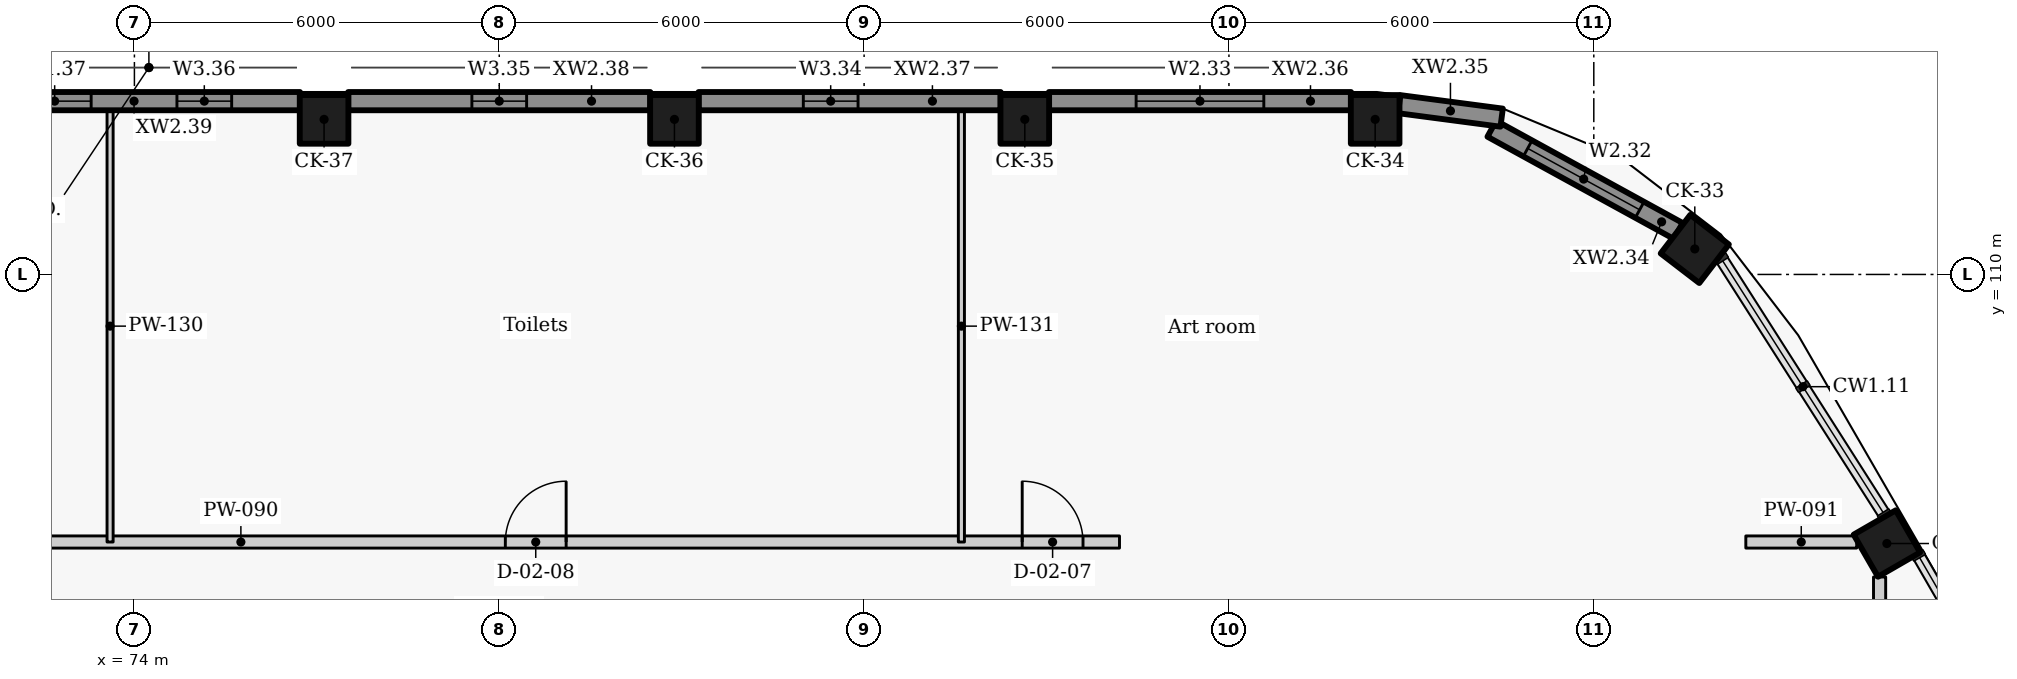
"""IFC4 building model, lengths in metres.
Left out: names, types, materials, properties, quantities, classifications, styles, units other than length and angle.
Written with IfcOpenShell. Run it as: python <this file> out.ifc"""

import sys

from ifc_helpers import new_model, si_unit, direction, frame, frame_2d, origin, origin_2d, place, context, subcontext, project, spatial, rectangle, extrude, element, fill, save


model = new_model("IFC4")
c1 = context("Model", 3, precision=1e-05, world=origin(), true_north=direction((0.0, 1.0)))
c2 = subcontext(c1, "Body", "Model", "MODEL_VIEW")
j1 = project(units=[si_unit("LENGTHUNIT", "METRE"), si_unit("PLANEANGLEUNIT", "RADIAN")], contexts=[c1])
p1 = place(None, origin())
s1 = spatial("IfcSite", under=j1, at=p1, CompositionType="ELEMENT")
p2 = place(p1, origin())
s2 = spatial("IfcBuilding", under=s1, at=p2, CompositionType="ELEMENT")
p3 = place(p2, frame((0.0, 0.0, 11.4)))
s3 = spatial("IfcBuildingStorey", under=s2, at=p3, CompositionType="ELEMENT", Elevation=11.4)
for number, where, z_axis, x_axis in (
    (1, (102.82, 105.575, 0.0), (0.0, 0.0, 1.0), (-0.5, 0.866, 0.0)),
    (2, (99.661, 110.419, 0.0), (0.0, 0.0, 1.0), (-0.793, 0.609, 0.0)),
    (3, (94.404, 112.55, 0.0), (0.0, 0.0, 1.0), (-1.0, 0.0, 0.0)),
    (4, (88.643, 112.55, 0.0), (0.0, 0.0, 1.0), (-1.0, 0.0, 0.0)),
    (5, (82.881, 112.55, 0.0), (0.0, 0.0, 1.0), (-1.0, 0.0, 0.0)),
    (6, (77.119, 112.55, 0.0), (0.0, 0.0, 1.0), (-1.0, 0.0, 0.0)),
):
    element("IfcColumn", number, at=place(p3, frame(where, z_axis=z_axis, x_axis=x_axis)), inside=s3, PredefinedType="COLUMN", context=c2, shape_type="SweptSolid", body=[
        extrude(rectangle(XDim=0.8, YDim=0.8, at=origin_2d()), origin(), (0.0, 0.0, 1.0), 4.2),
    ])
p4 = place(p3, frame((99.389, 110.715, 0.0), z_axis=(0.0, 0.0, 1.0), x_axis=(-0.876785818174, 0.480881096581, 0.0)))
e7 = element("IfcWall", 7, at=p4, inside=s3, PredefinedType="SOLIDWALL", context=c2, shape_type="SweptSolid", body=[
    extrude(rectangle(XDim=3.497, YDim=0.3, at=frame_2d((1.748, 0.0))), origin(), (0.0, 0.0, 1.0), 3.0),
])
p5 = place(p4, frame((0.723, 0.0, 0.9)))
e8 = element("IfcOpeningElement", 8, at=p5, cuts=e7, PredefinedType="OPENING", context=c2, shape_type="SweptSolid", body=[
    extrude(rectangle(XDim=2.1, YDim=2.05, at=frame_2d((1.05, 1.025))), frame((0.0, 0.16, 0.0), z_axis=(0.0, -1.0, 0.0), x_axis=(1.0, 0.0, 0.0)), (0.0, 0.0, 1.0), 0.32),
])
p6 = place(p3, frame((96.485, 112.579, 0.0), z_axis=(0.0, 0.0, 1.0), x_axis=(-0.991431291018, 0.130629227937, 0.0)))
e9 = element("IfcWall", 9, at=p6, inside=s3, PredefinedType="SOLIDWALL", context=c2, shape_type="SweptSolid", body=[
    extrude(rectangle(XDim=1.699, YDim=0.3, at=frame_2d((0.85, 0.0))), origin(), (0.0, 0.0, 1.0), 3.0),
])
p7 = place(p3, frame((94.008, 112.85, 0.0), z_axis=(0.0, 0.0, 1.0), x_axis=(-1.0, 0.0, 0.0)))
e10 = element("IfcWall", 10, at=p7, inside=s3, PredefinedType="SOLIDWALL", context=c2, shape_type="SweptSolid", body=[
    extrude(rectangle(XDim=4.97, YDim=0.3, at=frame_2d((2.485, 0.0))), origin(), (0.0, 0.0, 1.0), 3.0),
])
p8 = place(p7, frame((1.435, 0.0, 0.9)))
e11 = element("IfcOpeningElement", 11, at=p8, cuts=e10, PredefinedType="OPENING", context=c2, shape_type="SweptSolid", body=[
    extrude(rectangle(XDim=2.1, YDim=2.05, at=frame_2d((1.05, 1.025))), frame((0.0, 0.16, 0.0), z_axis=(0.0, -1.0, 0.0), x_axis=(1.0, 0.0, 0.0)), (0.0, 0.0, 1.0), 0.32),
])
p9 = place(p3, frame((88.247, 112.85, 0.0), z_axis=(0.0, 0.0, 1.0), x_axis=(-1.0, 0.0, 0.0)))
e12 = element("IfcWall", 12, at=p9, inside=s3, PredefinedType="SOLIDWALL", context=c2, shape_type="SweptSolid", body=[
    extrude(rectangle(XDim=4.97, YDim=0.3, at=frame_2d((2.485, 0.0))), origin(), (0.0, 0.0, 1.0), 3.0),
])
p10 = place(p9, frame((2.346, 0.0, 1.5)))
e13 = element("IfcOpeningElement", 13, at=p10, cuts=e12, PredefinedType="OPENING", context=c2, shape_type="SweptSolid", body=[
    extrude(rectangle(XDim=0.9, YDim=1.45, at=frame_2d((0.45, 0.725))), frame((0.0, 0.16, 0.0), z_axis=(0.0, -1.0, 0.0), x_axis=(1.0, 0.0, 0.0)), (0.0, 0.0, 1.0), 0.32),
])
p11 = place(p3, frame((82.485, 112.85, 0.0), z_axis=(0.0, 0.0, 1.0), x_axis=(-1.0, 0.0, 0.0)))
e14 = element("IfcWall", 14, at=p11, inside=s3, PredefinedType="SOLIDWALL", context=c2, shape_type="SweptSolid", body=[
    extrude(rectangle(XDim=4.97, YDim=0.3, at=frame_2d((2.485, 0.0))), origin(), (0.0, 0.0, 1.0), 3.0),
])
p12 = place(p11, frame((2.035, 0.0, 1.5)))
e15 = element("IfcOpeningElement", 15, at=p12, cuts=e14, PredefinedType="OPENING", context=c2, shape_type="SweptSolid", body=[
    extrude(rectangle(XDim=0.9, YDim=1.45, at=frame_2d((0.45, 0.725))), frame((0.0, 0.16, 0.0), z_axis=(0.0, -1.0, 0.0), x_axis=(1.0, 0.0, 0.0)), (0.0, 0.0, 1.0), 0.32),
])
p13 = place(p3, frame((76.723, 112.85, 0.0), z_axis=(0.0, 0.0, 1.0), x_axis=(-1.0, 0.0, 0.0)))
e16 = element("IfcWall", 16, at=p13, inside=s3, PredefinedType="SOLIDWALL", context=c2, shape_type="SweptSolid", body=[
    extrude(rectangle(XDim=4.97, YDim=0.3, at=frame_2d((2.485, 0.0))), origin(), (0.0, 0.0, 1.0), 3.0),
])
p14 = place(p13, frame((1.124, 0.0, 1.5)))
e17 = element("IfcOpeningElement", 17, at=p14, cuts=e16, PredefinedType="OPENING", context=c2, shape_type="SweptSolid", body=[
    extrude(rectangle(XDim=0.9, YDim=1.45, at=frame_2d((0.45, 0.725))), frame((0.0, 0.16, 0.0), z_axis=(0.0, -1.0, 0.0), x_axis=(1.0, 0.0, 0.0)), (0.0, 0.0, 1.0), 0.32),
])
p15 = place(p13, frame((3.434, 0.0, 0.9)))
e18 = element("IfcOpeningElement", 18, at=p15, cuts=e16, PredefinedType="OPENING", context=c2, shape_type="SweptSolid", body=[
    extrude(rectangle(XDim=1.2, YDim=2.05, at=frame_2d((0.6, 1.025))), frame((0.0, 0.16, 0.0), z_axis=(0.0, -1.0, 0.0), x_axis=(1.0, 0.0, 0.0)), (0.0, 0.0, 1.0), 0.32),
])
p16 = place(p3, frame((102.7, 105.025, 0.0), z_axis=(0.0, 0.0, 1.0), x_axis=(0.0, -1.0, 0.0)))
e19 = element("IfcWall", 19, at=p16, inside=s3, PredefinedType="PARTITIONING", context=c2, shape_type="SweptSolid", body=[
    extrude(rectangle(XDim=6.578, YDim=0.2, at=frame_2d((3.289, 0.0))), origin(), (0.0, 0.0, 1.0), 3.9),
])
p17 = place(p16, frame((2.539, 0.0, 0.0)))
e20 = element("IfcOpeningElement", 20, at=p17, cuts=e19, PredefinedType="OPENING", context=c2, shape_type="SweptSolid", body=[
    extrude(rectangle(XDim=1.5, YDim=2.1, at=frame_2d((0.75, 1.05))), frame((0.0, 0.11, 0.0), z_axis=(0.0, -1.0, 0.0), x_axis=(1.0, 0.0, 0.0)), (0.0, 0.0, 1.0), 0.22),
])
p18 = place(p3, frame((69.8, 105.6, 0.0), z_axis=(0.0, 0.0, 1.0), x_axis=(1.0, 0.0, 0.0)))
e21 = element("IfcWall", 21, at=p18, inside=s3, PredefinedType="PARTITIONING", context=c2, shape_type="SweptSolid", body=[
    extrude(rectangle(XDim=20.4, YDim=0.2, at=frame_2d((10.2, 0.0))), origin(), (0.0, 0.0, 1.0), 3.9),
])
p19 = place(p18, frame((0.602, 0.0, 0.0)))
e22 = element("IfcOpeningElement", 22, at=p19, cuts=e21, PredefinedType="OPENING", context=c2, shape_type="SweptSolid", body=[
    extrude(rectangle(XDim=1.0, YDim=2.1, at=frame_2d((0.5, 1.05))), frame((0.0, 0.11, 0.0), z_axis=(0.0, -1.0, 0.0), x_axis=(1.0, 0.0, 0.0)), (0.0, 0.0, 1.0), 0.22),
])
p20 = place(p18, frame((18.8, 0.0, 0.0)))
e23 = element("IfcOpeningElement", 23, at=p20, cuts=e21, PredefinedType="OPENING", context=c2, shape_type="SweptSolid", body=[
    extrude(rectangle(XDim=1.0, YDim=2.1, at=frame_2d((0.5, 1.05))), frame((0.0, 0.11, 0.0), z_axis=(0.0, -1.0, 0.0), x_axis=(1.0, 0.0, 0.0)), (0.0, 0.0, 1.0), 0.22),
])
p21 = place(p18, frame((10.3, 0.0, 0.0)))
e24 = element("IfcOpeningElement", 24, at=p21, cuts=e21, PredefinedType="OPENING", context=c2, shape_type="SweptSolid", body=[
    extrude(rectangle(XDim=1.0, YDim=2.1, at=frame_2d((0.5, 1.05))), frame((0.0, 0.11, 0.0), z_axis=(0.0, -1.0, 0.0), x_axis=(1.0, 0.0, 0.0)), (0.0, 0.0, 1.0), 0.22),
])
p22 = place(p3, frame((100.5, 105.6, 0.0), z_axis=(0.0, 0.0, 1.0), x_axis=(1.0, 0.0, 0.0)))
e25 = element("IfcWall", 25, at=p22, inside=s3, PredefinedType="PARTITIONING", context=c2, shape_type="SweptSolid", body=[
    extrude(rectangle(XDim=1.823, YDim=0.2, at=frame_2d((0.912, 0.0))), origin(), (0.0, 0.0, 1.0), 3.9),
])
for number, where, z_axis, x_axis in (
    (26, (73.6, 105.6, 0.0), (0.0, 0.0, 1.0), (0.0, 1.0, 0.0)),
    (27, (87.6, 105.6, 0.0), (0.0, 0.0, 1.0), (0.0, 1.0, 0.0)),
):
    element("IfcWall", number, at=place(p3, frame(where, z_axis=z_axis, x_axis=x_axis)), inside=s3, PredefinedType="PARTITIONING", context=c2, shape_type="SweptSolid", body=[
        extrude(rectangle(XDim=7.1, YDim=0.1, at=frame_2d((3.55, 0.0))), origin(), (0.0, 0.0, 1.0), 3.13),
    ])
p23 = place(p5, origin())
e28 = element("IfcWindow", 28, at=p23, inside=s3, PartitioningType="SINGLE_PANEL", PredefinedType="WINDOW", context=c2, shape_type="SweptSolid", body=[
    extrude(rectangle(XDim=2.1, YDim=2.05, at=frame_2d((1.05, 1.025))), frame((0.0, 0.03, 0.0), z_axis=(0.0, -1.0, 0.0), x_axis=(1.0, 0.0, 0.0)), (0.0, 0.0, 1.0), 0.06),
])
fill(e8, e28)
p24 = place(p8, origin())
e29 = element("IfcWindow", 29, at=p24, inside=s3, PartitioningType="SINGLE_PANEL", PredefinedType="WINDOW", context=c2, shape_type="SweptSolid", body=[
    extrude(rectangle(XDim=2.1, YDim=2.05, at=frame_2d((1.05, 1.025))), frame((0.0, 0.03, 0.0), z_axis=(0.0, -1.0, 0.0), x_axis=(1.0, 0.0, 0.0)), (0.0, 0.0, 1.0), 0.06),
])
fill(e11, e29)
p25 = place(p10, origin())
e30 = element("IfcWindow", 30, at=p25, inside=s3, PartitioningType="SINGLE_PANEL", PredefinedType="WINDOW", context=c2, shape_type="SweptSolid", body=[
    extrude(rectangle(XDim=0.9, YDim=1.45, at=frame_2d((0.45, 0.725))), frame((0.0, 0.03, 0.0), z_axis=(0.0, -1.0, 0.0), x_axis=(1.0, 0.0, 0.0)), (0.0, 0.0, 1.0), 0.06),
])
fill(e13, e30)
p26 = place(p12, origin())
e31 = element("IfcWindow", 31, at=p26, inside=s3, PartitioningType="SINGLE_PANEL", PredefinedType="WINDOW", context=c2, shape_type="SweptSolid", body=[
    extrude(rectangle(XDim=0.9, YDim=1.45, at=frame_2d((0.45, 0.725))), frame((0.0, 0.03, 0.0), z_axis=(0.0, -1.0, 0.0), x_axis=(1.0, 0.0, 0.0)), (0.0, 0.0, 1.0), 0.06),
])
fill(e15, e31)
p27 = place(p14, origin())
e32 = element("IfcWindow", 32, at=p27, inside=s3, PartitioningType="SINGLE_PANEL", PredefinedType="WINDOW", context=c2, shape_type="SweptSolid", body=[
    extrude(rectangle(XDim=0.9, YDim=1.45, at=frame_2d((0.45, 0.725))), frame((0.0, 0.03, 0.0), z_axis=(0.0, -1.0, 0.0), x_axis=(1.0, 0.0, 0.0)), (0.0, 0.0, 1.0), 0.06),
])
fill(e17, e32)
p28 = place(p15, origin())
e33 = element("IfcWindow", 33, at=p28, inside=s3, PartitioningType="SINGLE_PANEL", PredefinedType="WINDOW", context=c2, shape_type="SweptSolid", body=[
    extrude(rectangle(XDim=1.2, YDim=2.05, at=frame_2d((0.6, 1.025))), frame((0.0, 0.03, 0.0), z_axis=(0.0, -1.0, 0.0), x_axis=(1.0, 0.0, 0.0)), (0.0, 0.0, 1.0), 0.06),
])
fill(e18, e33)
p29 = place(p20, origin())
e34 = element("IfcDoor", 34, at=p29, inside=s3, OperationType="SINGLE_SWING_LEFT", PredefinedType="DOOR", context=c2, shape_type="SweptSolid", body=[
    extrude(rectangle(XDim=1.0, YDim=2.1, at=frame_2d((0.5, 1.05))), frame((0.0, 0.025, 0.0), z_axis=(0.0, -1.0, 0.0), x_axis=(1.0, 0.0, 0.0)), (0.0, 0.0, 1.0), 0.05),
])
fill(e23, e34)
p30 = place(p21, origin())
e35 = element("IfcDoor", 35, at=p30, inside=s3, OperationType="SINGLE_SWING_RIGHT", PredefinedType="DOOR", context=c2, shape_type="SweptSolid", body=[
    extrude(rectangle(XDim=1.0, YDim=2.1, at=frame_2d((0.5, 1.05))), frame((0.0, 0.025, 0.0), z_axis=(0.0, -1.0, 0.0), x_axis=(1.0, 0.0, 0.0)), (0.0, 0.0, 1.0), 0.05),
])
fill(e24, e35)
save(model, sys.argv[1])
